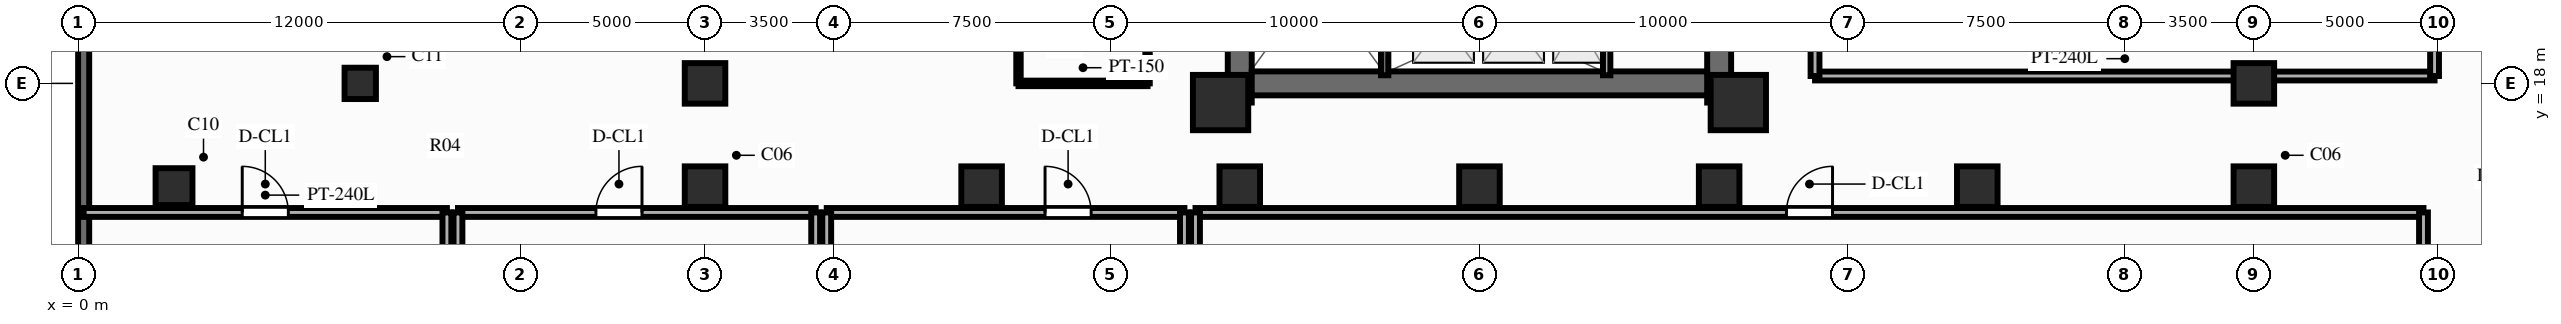
"""IFC4 building model, lengths in metres.
Left out: names, types, materials, properties, quantities, classifications, styles, units other than length and angle.
Written with IfcOpenShell. Run it as: python <this file> out.ifc"""

import sys

from ifc_helpers import new_model, si_unit, direction, frame, frame_2d, origin, origin_2d, place, context, subcontext, project, spatial, rectangle, circle, extrude, source, transform, mapped, element, fill, save


model = new_model("IFC4")
c1 = context("Model", 3, precision=1e-05, world=origin(), true_north=direction((0.0, 1.0)))
c2 = subcontext(c1, "Body", "Model", "MODEL_VIEW")
j1 = project(units=[si_unit("LENGTHUNIT", "METRE"), si_unit("PLANEANGLEUNIT", "RADIAN")], contexts=[c1])
p1 = place(None, origin())
s1 = spatial("IfcSite", under=j1, at=p1, CompositionType="ELEMENT")
p2 = place(p1, origin())
s2 = spatial("IfcBuilding", under=s1, at=p2, CompositionType="ELEMENT")
p3 = place(p2, frame((0.0, 0.0, 7.8)))
s3 = spatial("IfcBuildingStorey", under=s2, at=p3, CompositionType="ELEMENT", Elevation=7.8)
p4 = place(p3, frame((31.5, 17.48, 0.0), z_axis=(0.0, 0.0, 1.0), x_axis=(0.0, 1.0, 0.0)))
e1 = element("IfcWall", 1, at=p4, inside=s3, PredefinedType="SHEAR", context=c2, shape_type="SweptSolid", body=[
    extrude(rectangle(XDim=19.04, YDim=0.65, at=frame_2d((9.52, 0.0))), origin(), (0.0, 0.0, 1.0), 3.6),
])
p5 = place(p4, frame((6.32, 0.0, 0.0)))
e2 = element("IfcOpeningElement", 2, at=p5, cuts=e1, PredefinedType="OPENING", context=c2, shape_type="SweptSolid", body=[
    extrude(rectangle(XDim=1.1, YDim=2.15, at=frame_2d((0.55, 1.075))), frame((0.0, 0.337, 0.0), z_axis=(0.0, -1.0, 0.0), x_axis=(1.0, 0.0, 0.0)), (0.0, 0.0, 1.0), 0.674),
])
p6 = place(p3, frame((44.5, 17.48, 0.0), z_axis=(0.0, 0.0, 1.0), x_axis=(0.0, 1.0, 0.0)))
e3 = element("IfcWall", 3, at=p6, inside=s3, PredefinedType="SHEAR", context=c2, shape_type="SweptSolid", body=[
    extrude(rectangle(XDim=19.04, YDim=0.65, at=frame_2d((9.52, 0.0))), origin(), (0.0, 0.0, 1.0), 3.6),
])
p7 = place(p6, frame((12.67, 0.0, 0.0), z_axis=(0.0, 0.0, 1.0), x_axis=(-1.0, 0.0, 0.0)))
e4 = element("IfcOpeningElement", 4, at=p7, cuts=e3, PredefinedType="OPENING", context=c2, shape_type="SweptSolid", body=[
    extrude(rectangle(XDim=1.1, YDim=2.15, at=frame_2d((0.55, 1.075))), frame((0.0, 0.337, 0.0), z_axis=(0.0, -1.0, 0.0), x_axis=(1.0, 0.0, 0.0)), (0.0, 0.0, 1.0), 0.674),
])
p8 = place(p3, frame((31.825, 18.0, 0.0), z_axis=(0.0, 0.0, 1.0), x_axis=(1.0, 0.0, 0.0)))
e5 = element("IfcWall", 5, at=p8, inside=s3, PredefinedType="SHEAR", context=c2, shape_type="SweptSolid", body=[
    extrude(rectangle(XDim=12.35, YDim=0.65, at=frame_2d((6.175, 0.0))), origin(), (0.0, 0.0, 1.0), 3.6),
])
m1 = source(origin(), c2, "Body", "SweptSolid", [
    extrude(rectangle(XDim=1.5, YDim=1.5, at=origin_2d()), origin(), (0.0, 0.0, 1.0), 3.6),
])
for number, where, z_axis, x_axis in (
    (6, (30.98, 17.48, 0.0), (0.0, 0.0, 1.0), (1.0, 0.0, 0.0)),
    (7, (45.02, 17.48, 0.0), (0.0, 0.0, 1.0), (1.0, 0.0, 0.0)),
):
    element("IfcColumn", number, at=place(p3, frame(where, z_axis=z_axis, x_axis=x_axis)), inside=s3, PredefinedType="COLUMN", context=c2, shape_type="MappedRepresentation", body=[
        mapped(m1, transform((0.0, 0.0, 0.0), scale=1.0)),
    ])
m2 = source(origin(), c2, "Body", "SweptSolid", [
    extrude(circle(Radius=0.5, at=origin_2d()), origin(), (0.0, 0.0, 1.0), 3.6),
])
p9 = place(p3, frame((2.6, 15.2, 0.0), z_axis=(0.0, 0.0, 1.0), x_axis=(1.0, 0.0, 0.0)))
e8 = element("IfcColumn", 8, at=p9, inside=s3, PredefinedType="COLUMN", context=c2, shape_type="MappedRepresentation", body=[
    mapped(m2, transform((0.0, 0.0, 0.0), scale=1.0)),
])
m3 = source(origin(), c2, "Body", "SweptSolid", [
    extrude(circle(Radius=0.425, at=origin_2d()), origin(), (0.0, 0.0, 1.0), 3.6),
])
p10 = place(p3, frame((7.65, 18.0, 0.0), z_axis=(0.0, 0.0, 1.0), x_axis=(1.0, 0.0, 0.0)))
e9 = element("IfcColumn", 9, at=p10, inside=s3, PredefinedType="COLUMN", context=c2, shape_type="MappedRepresentation", body=[
    mapped(m3, transform((0.0, 0.0, 0.0), scale=1.0)),
])
m4 = source(origin(), c2, "Body", "SweptSolid", [
    extrude(rectangle(XDim=1.1, YDim=1.1, at=origin_2d()), origin(), (0.0, 0.0, 1.0), 3.6),
])
for number, where, z_axis, x_axis in (
    (10, (17.0, 15.2, 0.0), (0.0, 0.0, 1.0), (1.0, 0.0, 0.0)),
    (11, (59.0, 15.2, 0.0), (0.0, 0.0, 1.0), (1.0, 0.0, 0.0)),
    (12, (17.0, 18.0, 0.0), (0.0, 0.0, 1.0), (1.0, 0.0, 0.0)),
    (13, (59.0, 18.0, 0.0), (0.0, 0.0, 1.0), (1.0, 0.0, 0.0)),
    (14, (24.5, 15.2, 0.0), (0.0, 0.0, 1.0), (1.0, 0.0, 0.0)),
    (15, (31.5, 15.2, 0.0), (0.0, 0.0, 1.0), (1.0, 0.0, 0.0)),
    (16, (38.0, 15.2, 0.0), (0.0, 0.0, 1.0), (1.0, 0.0, 0.0)),
    (17, (44.5, 15.2, 0.0), (0.0, 0.0, 1.0), (1.0, 0.0, 0.0)),
    (18, (51.5, 15.2, 0.0), (0.0, 0.0, 1.0), (1.0, 0.0, 0.0)),
):
    element("IfcColumn", number, at=place(p3, frame(where, z_axis=z_axis, x_axis=x_axis)), inside=s3, PredefinedType="COLUMN", context=c2, shape_type="MappedRepresentation", body=[
        mapped(m4, transform((0.0, 0.0, 0.0), scale=1.0)),
    ])
p11 = place(p3, frame((0.15, 0.0, 0.0), z_axis=(0.0, 0.0, 1.0), x_axis=(0.0, 1.0, 0.0)))
e19 = element("IfcWall", 19, at=p11, inside=s3, PredefinedType="SOLIDWALL", context=c2, shape_type="SweptSolid", body=[
    extrude(rectangle(XDim=54.0, YDim=0.3, at=frame_2d((27.0, 0.0))), origin(), (0.0, 0.0, 1.0), 2.88),
])
p12 = place(p11, frame((6.405, 0.0, 0.85)))
e20 = element("IfcOpeningElement", 20, at=p12, cuts=e19, PredefinedType="OPENING", context=c2, shape_type="SweptSolid", body=[
    extrude(rectangle(XDim=1.8, YDim=1.65, at=frame_2d((0.9, 0.825))), frame((0.0, 0.162, 0.0), z_axis=(0.0, -1.0, 0.0), x_axis=(1.0, 0.0, 0.0)), (0.0, 0.0, 1.0), 0.324),
])
p13 = place(p11, frame((26.045, 0.0, 0.85)))
e21 = element("IfcOpeningElement", 21, at=p13, cuts=e19, PredefinedType="OPENING", context=c2, shape_type="SweptSolid", body=[
    extrude(rectangle(XDim=1.8, YDim=1.65, at=frame_2d((0.9, 0.825))), frame((0.0, 0.162, 0.0), z_axis=(0.0, -1.0, 0.0), x_axis=(1.0, 0.0, 0.0)), (0.0, 0.0, 1.0), 0.324),
])
p14 = place(p3, frame((41.45, 18.22, 0.0), z_axis=(0.0, 0.0, 1.0), x_axis=(0.0, 1.0, 0.0)))
e22 = element("IfcWall", 22, at=p14, inside=s3, PredefinedType="PARTITIONING", context=c2, shape_type="SweptSolid", body=[
    extrude(rectangle(XDim=2.96, YDim=0.2, at=frame_2d((1.48, 0.0))), origin(), (0.0, 0.0, 1.0), 3.32),
])
p15 = place(p3, frame((35.43, 18.22, 0.0), z_axis=(0.0, 0.0, 1.0), x_axis=(0.0, 1.0, 0.0)))
e23 = element("IfcWall", 23, at=p15, inside=s3, PredefinedType="SOLIDWALL", context=c2, shape_type="SweptSolid", body=[
    extrude(rectangle(XDim=7.22, YDim=0.2, at=frame_2d((3.61, 0.0))), origin(), (0.0, 0.0, 1.0), 3.32),
])
p16 = place(p15, frame((6.68, 0.0, 0.0), z_axis=(0.0, 0.0, 1.0), x_axis=(-1.0, 0.0, 0.0)))
e24 = element("IfcOpeningElement", 24, at=p16, cuts=e23, PredefinedType="OPENING", context=c2, shape_type="SweptSolid", body=[
    extrude(rectangle(XDim=1.1, YDim=2.15, at=frame_2d((0.55, 1.075))), frame((0.0, 0.112, 0.0), z_axis=(0.0, -1.0, 0.0), x_axis=(1.0, 0.0, 0.0)), (0.0, 0.0, 1.0), 0.224),
])
p17 = place(p3, frame((25.5, 18.0, 0.0), z_axis=(0.0, 0.0, 1.0), x_axis=(0.0, 1.0, 0.0)))
e25 = element("IfcWall", 25, at=p17, inside=s3, PredefinedType="PARTITIONING", context=c2, shape_type="SweptSolid", body=[
    extrude(rectangle(XDim=18.0, YDim=0.12, at=frame_2d((9.0, 0.0))), origin(), (0.0, 0.0, 1.0), 3.32),
])
p18 = place(p3, frame((29.0, 18.0, 0.0), z_axis=(0.0, 0.0, 1.0), x_axis=(0.0, 1.0, 0.0)))
e26 = element("IfcWall", 26, at=p18, inside=s3, PredefinedType="PARTITIONING", context=c2, shape_type="SweptSolid", body=[
    extrude(rectangle(XDim=4.0, YDim=0.12, at=frame_2d((2.0, 0.0))), origin(), (0.0, 0.0, 1.0), 3.32),
])
p19 = place(p18, frame((1.55, 0.0, 0.0)))
e27 = element("IfcOpeningElement", 27, at=p19, cuts=e26, PredefinedType="OPENING", context=c2, shape_type="SweptSolid", body=[
    extrude(rectangle(XDim=0.9, YDim=2.1, at=frame_2d((0.45, 1.05))), frame((0.0, 0.072, 0.0), z_axis=(0.0, -1.0, 0.0), x_axis=(1.0, 0.0, 0.0)), (0.0, 0.0, 1.0), 0.144),
])
p20 = place(p3, frame((25.5, 18.0, 0.0), z_axis=(0.0, 0.0, 1.0), x_axis=(1.0, 0.0, 0.0)))
e28 = element("IfcWall", 28, at=p20, inside=s3, PredefinedType="PARTITIONING", context=c2, shape_type="SweptSolid", body=[
    extrude(rectangle(XDim=3.5, YDim=0.15, at=frame_2d((1.75, 0.0))), origin(), (0.0, 0.0, 1.0), 2.69),
])
p21 = place(p3, frame((0.15, 14.5, 0.0), z_axis=(0.0, 0.0, 1.0), x_axis=(1.0, 0.0, 0.0)))
e29 = element("IfcWall", 29, at=p21, inside=s3, PredefinedType="PARTITIONING", context=c2, shape_type="SweptSolid", body=[
    extrude(rectangle(XDim=9.85, YDim=0.24, at=frame_2d((4.925, 0.0))), origin(), (0.0, 0.0, 1.0), 3.32),
])
p22 = place(p21, frame((4.3, 0.0, 0.0)))
e30 = element("IfcOpeningElement", 30, at=p22, cuts=e29, PredefinedType="OPENING", context=c2, shape_type="SweptSolid", body=[
    extrude(rectangle(XDim=1.25, YDim=2.15, at=frame_2d((0.625, 1.075))), frame((0.0, 0.132, 0.0), z_axis=(0.0, -1.0, 0.0), x_axis=(1.0, 0.0, 0.0)), (0.0, 0.0, 1.0), 0.264),
])
p23 = place(p3, frame((10.0, 0.1, 0.0), z_axis=(0.0, 0.0, 1.0), x_axis=(0.0, 1.0, 0.0)))
e31 = element("IfcWall", 31, at=p23, inside=s3, PredefinedType="PARTITIONING", context=c2, shape_type="SweptSolid", body=[
    extrude(rectangle(XDim=14.4, YDim=0.24, at=frame_2d((7.2, 0.0))), origin(), (0.0, 0.0, 1.0), 3.32),
])
p24 = place(p3, frame((10.3, 14.5, 0.0), z_axis=(0.0, 0.0, 1.0), x_axis=(1.0, 0.0, 0.0)))
e32 = element("IfcWall", 32, at=p24, inside=s3, PredefinedType="PARTITIONING", context=c2, shape_type="SweptSolid", body=[
    extrude(rectangle(XDim=9.7, YDim=0.24, at=frame_2d((4.85, 0.0))), origin(), (0.0, 0.0, 1.0), 3.32),
])
p25 = place(p24, frame((3.74, 0.0, 0.0)))
e33 = element("IfcOpeningElement", 33, at=p25, cuts=e32, PredefinedType="OPENING", context=c2, shape_type="SweptSolid", body=[
    extrude(rectangle(XDim=1.25, YDim=2.15, at=frame_2d((0.625, 1.075))), frame((0.0, 0.132, 0.0), z_axis=(0.0, -1.0, 0.0), x_axis=(1.0, 0.0, 0.0)), (0.0, 0.0, 1.0), 0.264),
])
for number, where, z_axis, x_axis in (
    (34, (10.3, 0.1, 0.0), (0.0, 0.0, 1.0), (0.0, 1.0, 0.0)),
    (35, (20.0, 0.1, 0.0), (0.0, 0.0, 1.0), (0.0, 1.0, 0.0)),
):
    element("IfcWall", number, at=place(p3, frame(where, z_axis=z_axis, x_axis=x_axis)), inside=s3, PredefinedType="PARTITIONING", context=c2, shape_type="SweptSolid", body=[
        extrude(rectangle(XDim=14.4, YDim=0.24, at=frame_2d((7.2, 0.0))), origin(), (0.0, 0.0, 1.0), 3.32),
    ])
p26 = place(p3, frame((20.3, 14.5, 0.0), z_axis=(0.0, 0.0, 1.0), x_axis=(1.0, 0.0, 0.0)))
e36 = element("IfcWall", 36, at=p26, inside=s3, PredefinedType="PARTITIONING", context=c2, shape_type="SweptSolid", body=[
    extrude(rectangle(XDim=9.7, YDim=0.24, at=frame_2d((4.85, 0.0))), origin(), (0.0, 0.0, 1.0), 3.32),
])
p27 = place(p26, frame((5.92, 0.0, 0.0)))
e37 = element("IfcOpeningElement", 37, at=p27, cuts=e36, PredefinedType="OPENING", context=c2, shape_type="SweptSolid", body=[
    extrude(rectangle(XDim=1.25, YDim=2.15, at=frame_2d((0.625, 1.075))), frame((0.0, 0.132, 0.0), z_axis=(0.0, -1.0, 0.0), x_axis=(1.0, 0.0, 0.0)), (0.0, 0.0, 1.0), 0.264),
])
for number, where, z_axis, x_axis in (
    (38, (20.3, 0.1, 0.0), (0.0, 0.0, 1.0), (0.0, 1.0, 0.0)),
    (39, (30.0, 0.1, 0.0), (0.0, 0.0, 1.0), (0.0, 1.0, 0.0)),
):
    element("IfcWall", number, at=place(p3, frame(where, z_axis=z_axis, x_axis=x_axis)), inside=s3, PredefinedType="PARTITIONING", context=c2, shape_type="SweptSolid", body=[
        extrude(rectangle(XDim=14.4, YDim=0.24, at=frame_2d((7.2, 0.0))), origin(), (0.0, 0.0, 1.0), 3.32),
    ])
p28 = place(p3, frame((30.3, 14.5, 0.0), z_axis=(0.0, 0.0, 1.0), x_axis=(1.0, 0.0, 0.0)))
e40 = element("IfcWall", 40, at=p28, inside=s3, PredefinedType="PARTITIONING", context=c2, shape_type="SweptSolid", body=[
    extrude(rectangle(XDim=33.3, YDim=0.24, at=frame_2d((16.65, 0.0))), origin(), (0.0, 0.0, 1.0), 3.32),
])
p29 = place(p28, frame((16.025, 0.0, 0.0)))
e41 = element("IfcOpeningElement", 41, at=p29, cuts=e40, PredefinedType="OPENING", context=c2, shape_type="SweptSolid", body=[
    extrude(rectangle(XDim=1.25, YDim=2.15, at=frame_2d((0.625, 1.075))), frame((0.0, 0.132, 0.0), z_axis=(0.0, -1.0, 0.0), x_axis=(1.0, 0.0, 0.0)), (0.0, 0.0, 1.0), 0.264),
])
for number, where, z_axis, x_axis in (
    (42, (30.3, 0.1, 0.0), (0.0, 0.0, 1.0), (0.0, 1.0, 0.0)),
    (43, (63.6, 0.1, 0.0), (0.0, 0.0, 1.0), (0.0, 1.0, 0.0)),
):
    element("IfcWall", number, at=place(p3, frame(where, z_axis=z_axis, x_axis=x_axis)), inside=s3, PredefinedType="PARTITIONING", context=c2, shape_type="SweptSolid", body=[
        extrude(rectangle(XDim=14.4, YDim=0.24, at=frame_2d((7.2, 0.0))), origin(), (0.0, 0.0, 1.0), 3.32),
    ])
p30 = place(p3, frame((47.1, 18.2, 0.0), z_axis=(0.0, 0.0, 1.0), x_axis=(1.0, 0.0, 0.0)))
e44 = element("IfcWall", 44, at=p30, inside=s3, PredefinedType="PARTITIONING", context=c2, shape_type="SweptSolid", body=[
    extrude(rectangle(XDim=16.8, YDim=0.24, at=frame_2d((8.4, 0.0))), origin(), (0.0, 0.0, 1.0), 3.32),
])
p31 = place(p3, frame((47.1, 18.2, 0.0), z_axis=(0.0, 0.0, 1.0), x_axis=(0.0, 1.0, 0.0)))
e45 = element("IfcWall", 45, at=p31, inside=s3, PredefinedType="PARTITIONING", context=c2, shape_type="SweptSolid", body=[
    extrude(rectangle(XDim=17.6, YDim=0.24, at=frame_2d((8.8, 0.0))), origin(), (0.0, 0.0, 1.0), 3.32),
])
p32 = place(p3, frame((63.9, 18.2, 0.0), z_axis=(0.0, 0.0, 1.0), x_axis=(0.0, 1.0, 0.0)))
e46 = element("IfcWall", 46, at=p32, inside=s3, PredefinedType="PARTITIONING", context=c2, shape_type="SweptSolid", body=[
    extrude(rectangle(XDim=17.6, YDim=0.24, at=frame_2d((8.8, 0.0))), origin(), (0.0, 0.0, 1.0), 3.32),
])
p33 = place(p32, frame((7.686, 0.0, 0.0)))
e47 = element("IfcOpeningElement", 47, at=p33, cuts=e46, PredefinedType="OPENING", context=c2, shape_type="SweptSolid", body=[
    extrude(rectangle(XDim=1.25, YDim=2.15, at=frame_2d((0.625, 1.075))), frame((0.0, 0.132, 0.0), z_axis=(0.0, -1.0, 0.0), x_axis=(1.0, 0.0, 0.0)), (0.0, 0.0, 1.0), 0.264),
])
m5 = source(origin(), c2, "Body", "SweptSolid", [
    extrude(rectangle(XDim=1.25, YDim=2.15, at=frame_2d((0.625, 1.075))), frame((0.0, 0.025, 0.0), z_axis=(0.0, -1.0, 0.0), x_axis=(1.0, 0.0, 0.0)), (0.0, 0.0, 1.0), 0.05),
])
p34 = place(p22, origin())
e48 = element("IfcDoor", 48, at=p34, inside=s3, OperationType="SINGLE_SWING_LEFT", PredefinedType="DOOR", context=c2, shape_type="MappedRepresentation", body=[
    mapped(m5, transform((0.0, 0.0, 0.0), scale=1.0)),
])
fill(e30, e48)
p35 = place(p25, origin())
e49 = element("IfcDoor", 49, at=p35, inside=s3, OperationType="SINGLE_SWING_RIGHT", PredefinedType="DOOR", context=c2, shape_type="MappedRepresentation", body=[
    mapped(m5, transform((0.0, 0.0, 0.0), scale=1.0)),
])
fill(e33, e49)
p36 = place(p27, origin())
e50 = element("IfcDoor", 50, at=p36, inside=s3, OperationType="SINGLE_SWING_LEFT", PredefinedType="DOOR", context=c2, shape_type="MappedRepresentation", body=[
    mapped(m5, transform((0.0, 0.0, 0.0), scale=1.0)),
])
fill(e37, e50)
p37 = place(p29, origin())
e51 = element("IfcDoor", 51, at=p37, inside=s3, OperationType="SINGLE_SWING_RIGHT", PredefinedType="DOOR", context=c2, shape_type="MappedRepresentation", body=[
    mapped(m5, transform((0.0, 0.0, 0.0), scale=1.0)),
])
fill(e41, e51)
save(model, sys.argv[1])
